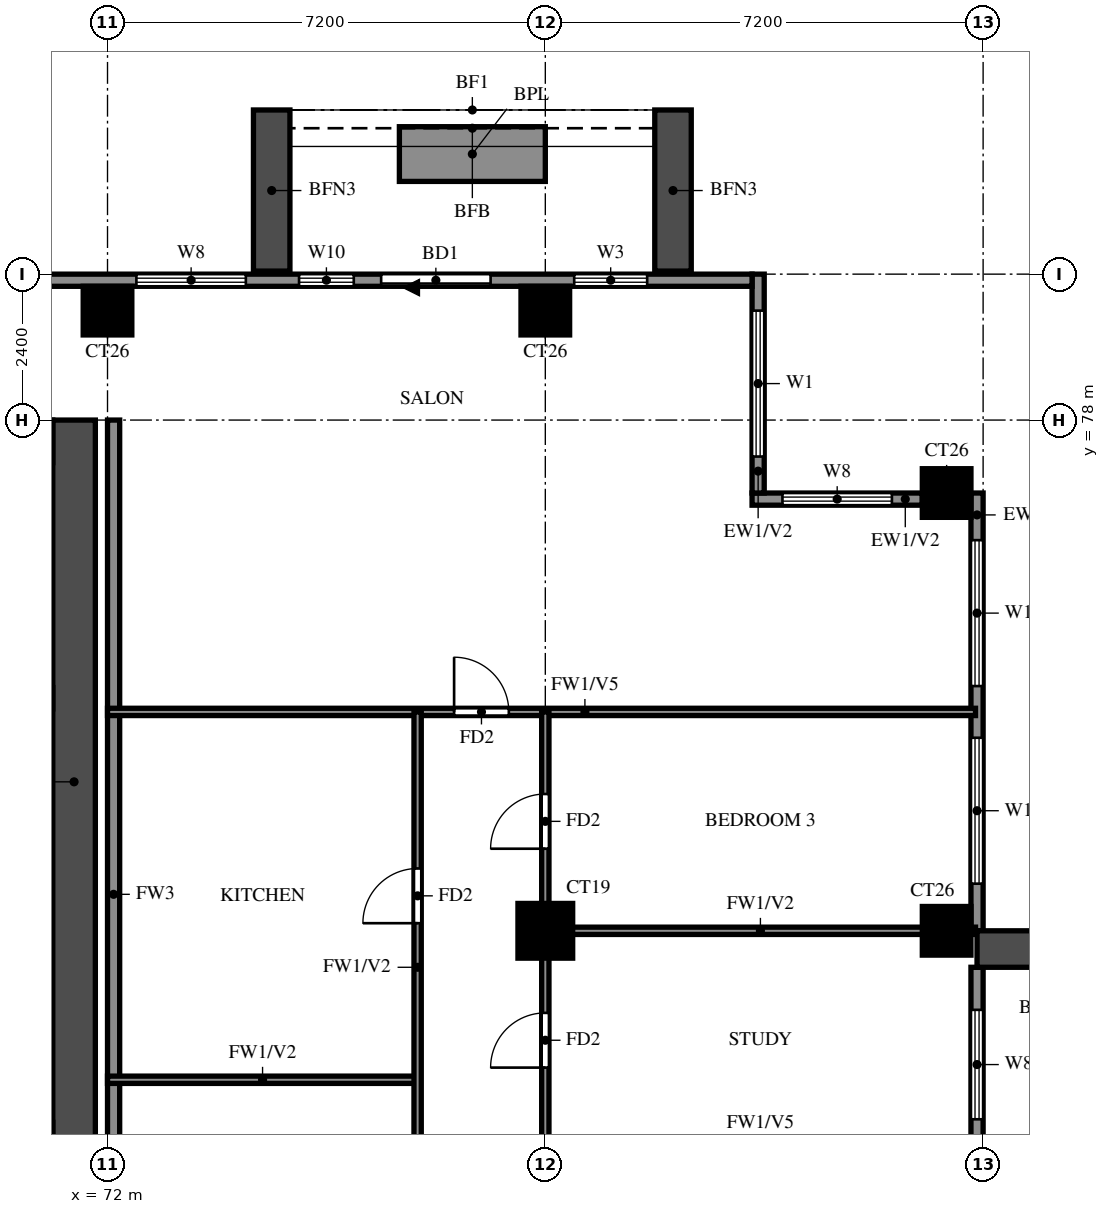
"""IFC4 building model, lengths in metres.
Left out: names, types, materials, properties, quantities, classifications, styles, units other than length and angle.
Written with IfcOpenShell. Run it as: python <this file> out.ifc"""

import sys

from ifc_helpers import new_model, si_unit, direction, frame, frame_2d, origin, origin_2d, place, context, subcontext, project, spatial, rectangle, extrude, source, transform, mapped, element, fill, save


model = new_model("IFC4")
c1 = context("Model", 3, precision=1e-05, world=origin(), true_north=direction((0.0, 1.0)))
c2 = subcontext(c1, "Body", "Model", "MODEL_VIEW")
j1 = project(units=[si_unit("LENGTHUNIT", "METRE"), si_unit("PLANEANGLEUNIT", "RADIAN")], contexts=[c1])
p1 = place(None, origin())
s1 = spatial("IfcSite", under=j1, at=p1, CompositionType="ELEMENT")
p2 = place(p1, origin())
s2 = spatial("IfcBuilding", under=s1, at=p2, CompositionType="ELEMENT")
p3 = place(p2, frame((0.0, 0.0, 192.0)))
s3 = spatial("IfcBuildingStorey", under=s2, at=p3, CompositionType="ELEMENT", Elevation=192.0)
m1 = source(origin(), c2, "Body", "SweptSolid", [
    extrude(rectangle(XDim=0.9, YDim=0.9, at=origin_2d()), origin(), (0.0, 0.0, 1.0), 3.2),
])
p4 = place(p3, frame((79.2, 69.6, 0.0), z_axis=(0.0, 0.0, 1.0), x_axis=(1.0, 0.0, 0.0)))
e1 = element("IfcColumn", 1, at=p4, inside=s3, PredefinedType="COLUMN", context=c2, shape_type="MappedRepresentation", body=[
    mapped(m1, transform((0.0, 0.0, 0.0))),
])
m2 = source(origin(), c2, "Body", "SweptSolid", [
    extrude(rectangle(XDim=0.8, YDim=0.8, at=origin_2d()), origin(), (0.0, 0.0, 1.0), 3.2),
])
for number, where, z_axis, x_axis in (
    (2, (85.8, 69.6, 0.0), (0.0, 0.0, 1.0), (1.0, 0.0, 0.0)),
    (3, (85.8, 76.8, 0.0), (0.0, 0.0, 1.0), (1.0, 0.0, 0.0)),
    (4, (72.0, 79.8, 0.0), (0.0, 0.0, 1.0), (1.0, 0.0, 0.0)),
    (5, (79.2, 79.8, 0.0), (0.0, 0.0, 1.0), (1.0, 0.0, 0.0)),
):
    element("IfcColumn", number, at=place(p3, frame(where, z_axis=z_axis, x_axis=x_axis)), inside=s3, PredefinedType="COLUMN", context=c2, shape_type="MappedRepresentation", body=[
        mapped(m2, transform((0.0, 0.0, 0.0))),
    ])
p5 = place(p3, frame((71.45, 66.1, 0.0), z_axis=(0.0, 0.0, 1.0), x_axis=(0.0, 1.0, 0.0)))
e6 = element("IfcWall", 6, at=p5, inside=s3, PredefinedType="SHEAR", context=c2, shape_type="SweptSolid", body=[
    extrude(rectangle(XDim=11.9, YDim=0.7, at=frame_2d((5.95, 0.0))), origin(), (0.0, 0.0, 1.0), 3.2),
])
p6 = place(p3, frame((29.7, 77.65, 0.0), z_axis=(0.0, 0.0, 1.0), x_axis=(1.0, 0.0, 0.0)))
e7 = element("IfcWall", 7, at=p6, inside=s3, PredefinedType="SHEAR", context=c2, shape_type="SweptSolid", body=[
    extrude(rectangle(XDim=41.4, YDim=0.7, at=frame_2d((20.7, 0.0))), origin(), (0.0, 0.0, 1.0), 3.2),
])
p7 = place(p3, frame((29.7, 66.275, 0.0), z_axis=(0.0, 0.0, 1.0), x_axis=(1.0, 0.0, 0.0)))
e8 = element("IfcWall", 8, at=p7, inside=s3, PredefinedType="SHEAR", context=c2, shape_type="SweptSolid", body=[
    extrude(rectangle(XDim=41.4, YDim=0.35, at=frame_2d((20.7, 0.0))), origin(), (0.0, 0.0, 1.0), 3.2),
])
p8 = place(p7, frame((0.925, 0.0, 0.0)))
e9 = element("IfcOpeningElement", 9, at=p8, cuts=e8, PredefinedType="OPENING", context=c2, shape_type="SweptSolid", body=[
    extrude(rectangle(XDim=1.1, YDim=2.1, at=frame_2d((0.55, 1.05))), frame((0.0, 0.185, 0.0), z_axis=(0.0, -1.0, 0.0), x_axis=(1.0, 0.0, 0.0)), (0.0, 0.0, 1.0), 0.37),
])
p9 = place(p7, frame((3.712, 0.0, 0.0)))
e10 = element("IfcOpeningElement", 10, at=p9, cuts=e8, PredefinedType="OPENING", context=c2, shape_type="SweptSolid", body=[
    extrude(rectangle(XDim=1.8, YDim=2.1, at=frame_2d((0.9, 1.05))), frame((0.0, 0.185, 0.0), z_axis=(0.0, -1.0, 0.0), x_axis=(1.0, 0.0, 0.0)), (0.0, 0.0, 1.0), 0.37),
])
p10 = place(p3, frame((86.3, 63.0, 0.0), z_axis=(0.0, 0.0, 1.0), x_axis=(0.0, 1.0, 0.0)))
e11 = element("IfcWall", 11, at=p10, inside=s3, PredefinedType="SOLIDWALL", context=c2, shape_type="SweptSolid", body=[
    extrude(rectangle(XDim=6.0, YDim=0.2, at=frame_2d((3.0, 0.0))), origin(), (0.0, 0.0, 1.0), 3.2),
])
p11 = place(p10, frame((0.9, 0.0, 0.0)))
e12 = element("IfcOpeningElement", 12, at=p11, cuts=e11, PredefinedType="OPENING", context=c2, shape_type="SweptSolid", body=[
    extrude(rectangle(XDim=1.8, YDim=2.4, at=frame_2d((0.9, 1.2))), frame((0.0, 0.11, 0.0), z_axis=(0.0, -1.0, 0.0), x_axis=(1.0, 0.0, 0.0)), (0.0, 0.0, 1.0), 0.22),
])
p12 = place(p10, frame((3.5, 0.0, 0.6)))
e13 = element("IfcOpeningElement", 13, at=p12, cuts=e11, PredefinedType="OPENING", context=c2, shape_type="SweptSolid", body=[
    extrude(rectangle(XDim=1.8, YDim=2.4, at=frame_2d((0.9, 1.2))), frame((0.0, 0.11, 0.0), z_axis=(0.0, -1.0, 0.0), x_axis=(1.0, 0.0, 0.0)), (0.0, 0.0, 1.0), 0.22),
])
p13 = place(p3, frame((86.3, 69.6, 0.0), z_axis=(0.0, 0.0, 1.0), x_axis=(0.0, 1.0, 0.0)))
e14 = element("IfcWall", 14, at=p13, inside=s3, PredefinedType="SOLIDWALL", context=c2, shape_type="SweptSolid", body=[
    extrude(rectangle(XDim=7.2, YDim=0.2, at=frame_2d((3.6, 0.0))), origin(), (0.0, 0.0, 1.0), 3.2),
])
p14 = place(p13, frame((0.775, 0.0, 0.6)))
e15 = element("IfcOpeningElement", 15, at=p14, cuts=e14, PredefinedType="OPENING", context=c2, shape_type="SweptSolid", body=[
    extrude(rectangle(XDim=2.4, YDim=2.4, at=frame_2d((1.2, 1.2))), frame((0.0, 0.11, 0.0), z_axis=(0.0, -1.0, 0.0), x_axis=(1.0, 0.0, 0.0)), (0.0, 0.0, 1.0), 0.22),
])
p15 = place(p13, frame((4.025, 0.0, 0.6)))
e16 = element("IfcOpeningElement", 16, at=p15, cuts=e14, PredefinedType="OPENING", context=c2, shape_type="SweptSolid", body=[
    extrude(rectangle(XDim=2.4, YDim=2.4, at=frame_2d((1.2, 1.2))), frame((0.0, 0.11, 0.0), z_axis=(0.0, -1.0, 0.0), x_axis=(1.0, 0.0, 0.0)), (0.0, 0.0, 1.0), 0.22),
])
p16 = place(p3, frame((85.4, 76.7, 0.0), z_axis=(0.0, 0.0, 1.0), x_axis=(-1.0, 0.0, 0.0)))
e17 = element("IfcWall", 17, at=p16, inside=s3, PredefinedType="SOLIDWALL", context=c2, shape_type="SweptSolid", body=[
    extrude(rectangle(XDim=2.8, YDim=0.2, at=frame_2d((1.4, 0.0))), origin(), (0.0, 0.0, 1.0), 3.2),
])
p17 = place(p16, frame((0.5, 0.0, 0.6)))
e18 = element("IfcOpeningElement", 18, at=p17, cuts=e17, PredefinedType="OPENING", context=c2, shape_type="SweptSolid", body=[
    extrude(rectangle(XDim=1.8, YDim=2.4, at=frame_2d((0.9, 1.2))), frame((0.0, 0.11, 0.0), z_axis=(0.0, -1.0, 0.0), x_axis=(1.0, 0.0, 0.0)), (0.0, 0.0, 1.0), 0.22),
])
p18 = place(p3, frame((82.7, 76.8, 0.0), z_axis=(0.0, 0.0, 1.0), x_axis=(0.0, 1.0, 0.0)))
e19 = element("IfcWall", 19, at=p18, inside=s3, PredefinedType="SOLIDWALL", context=c2, shape_type="SweptSolid", body=[
    extrude(rectangle(XDim=3.6, YDim=0.2, at=frame_2d((1.8, 0.0))), origin(), (0.0, 0.0, 1.0), 3.2),
])
p19 = place(p18, frame((0.6, 0.0, 0.6)))
e20 = element("IfcOpeningElement", 20, at=p19, cuts=e19, PredefinedType="OPENING", context=c2, shape_type="SweptSolid", body=[
    extrude(rectangle(XDim=2.4, YDim=2.4, at=frame_2d((1.2, 1.2))), frame((0.0, 0.11, 0.0), z_axis=(0.0, -1.0, 0.0), x_axis=(1.0, 0.0, 0.0)), (0.0, 0.0, 1.0), 0.22),
])
p20 = place(p3, frame((82.6, 80.3, 0.0), z_axis=(0.0, 0.0, 1.0), x_axis=(-1.0, 0.0, 0.0)))
e21 = element("IfcWall", 21, at=p20, inside=s3, PredefinedType="SOLIDWALL", context=c2, shape_type="SweptSolid", body=[
    extrude(rectangle(XDim=64.6, YDim=0.2, at=frame_2d((32.3, 0.0))), origin(), (0.0, 0.0, 1.0), 3.2),
])
p21 = place(p20, frame((4.3, 0.0, 0.0)))
e22 = element("IfcOpeningElement", 22, at=p21, cuts=e21, PredefinedType="OPENING", context=c2, shape_type="SweptSolid", body=[
    extrude(rectangle(XDim=1.8, YDim=2.4, at=frame_2d((0.9, 1.2))), frame((0.0, 0.11, 0.0), z_axis=(0.0, -1.0, 0.0), x_axis=(1.0, 0.0, 0.0)), (0.0, 0.0, 1.0), 0.22),
])
p22 = place(p20, frame((54.75, 0.0, 0.6)))
e23 = element("IfcOpeningElement", 23, at=p22, cuts=e21, PredefinedType="OPENING", context=c2, shape_type="SweptSolid", body=[
    extrude(rectangle(XDim=2.4, YDim=2.4, at=frame_2d((1.2, 1.2))), frame((0.0, 0.11, 0.0), z_axis=(0.0, -1.0, 0.0), x_axis=(1.0, 0.0, 0.0)), (0.0, 0.0, 1.0), 0.22),
])
p23 = place(p20, frame((57.65, 0.0, 0.6)))
e24 = element("IfcOpeningElement", 24, at=p23, cuts=e21, PredefinedType="OPENING", context=c2, shape_type="SweptSolid", body=[
    extrude(rectangle(XDim=2.4, YDim=2.4, at=frame_2d((1.2, 1.2))), frame((0.0, 0.11, 0.0), z_axis=(0.0, -1.0, 0.0), x_axis=(1.0, 0.0, 0.0)), (0.0, 0.0, 1.0), 0.22),
])
p24 = place(p20, frame((61.975, 0.0, 0.6)))
e25 = element("IfcOpeningElement", 25, at=p24, cuts=e21, PredefinedType="OPENING", context=c2, shape_type="SweptSolid", body=[
    extrude(rectangle(XDim=1.8, YDim=2.4, at=frame_2d((0.9, 1.2))), frame((0.0, 0.11, 0.0), z_axis=(0.0, -1.0, 0.0), x_axis=(1.0, 0.0, 0.0)), (0.0, 0.0, 1.0), 0.22),
])
p25 = place(p20, frame((1.725, 0.0, 0.6)))
e26 = element("IfcOpeningElement", 26, at=p25, cuts=e21, PredefinedType="OPENING", context=c2, shape_type="SweptSolid", body=[
    extrude(rectangle(XDim=1.2, YDim=2.4, at=frame_2d((0.6, 1.2))), frame((0.0, 0.11, 0.0), z_axis=(0.0, -1.0, 0.0), x_axis=(1.0, 0.0, 0.0)), (0.0, 0.0, 1.0), 0.22),
])
p26 = place(p20, frame((6.55, 0.0, 0.6)))
e27 = element("IfcOpeningElement", 27, at=p26, cuts=e21, PredefinedType="OPENING", context=c2, shape_type="SweptSolid", body=[
    extrude(rectangle(XDim=0.9, YDim=2.4, at=frame_2d((0.45, 1.2))), frame((0.0, 0.11, 0.0), z_axis=(0.0, -1.0, 0.0), x_axis=(1.0, 0.0, 0.0)), (0.0, 0.0, 1.0), 0.22),
])
p27 = place(p20, frame((8.325, 0.0, 0.6)))
e28 = element("IfcOpeningElement", 28, at=p27, cuts=e21, PredefinedType="OPENING", context=c2, shape_type="SweptSolid", body=[
    extrude(rectangle(XDim=1.8, YDim=2.4, at=frame_2d((0.9, 1.2))), frame((0.0, 0.11, 0.0), z_axis=(0.0, -1.0, 0.0), x_axis=(1.0, 0.0, 0.0)), (0.0, 0.0, 1.0), 0.22),
])
p28 = place(p3, frame((86.3, 69.3, 0.0), z_axis=(0.0, 0.0, 1.0), x_axis=(1.0, 0.0, 0.0)))
e29 = element("IfcWall", 29, at=p28, inside=s3, PredefinedType="SOLIDWALL", context=c2, shape_type="SweptSolid", body=[
    extrude(rectangle(XDim=2.8, YDim=0.6, at=frame_2d((1.4, 0.0))), origin(), (0.0, 0.0, 1.0), 2.85),
])
for number, where, z_axis, x_axis in (
    (30, (81.3, 80.45, 0.0), (0.0, 0.0, 1.0), (0.0, 1.0, 0.0)),
    (31, (74.7, 80.45, 0.0), (0.0, 0.0, 1.0), (0.0, 1.0, 0.0)),
):
    element("IfcWall", number, at=place(p3, frame(where, z_axis=z_axis, x_axis=x_axis)), inside=s3, PredefinedType="SOLIDWALL", context=c2, shape_type="SweptSolid", body=[
        extrude(rectangle(XDim=2.65, YDim=0.6, at=frame_2d((1.325, 0.0))), origin(), (0.0, 0.0, 1.0), 2.85),
    ])
p29 = place(p3, frame((79.2, 82.375, 0.0), z_axis=(0.0, 0.0, 1.0), x_axis=(-1.0, 0.0, 0.0)))
e32 = element("IfcWall", 32, at=p29, inside=s3, PredefinedType="SOLIDWALL", context=c2, shape_type="SweptSolid", body=[
    extrude(rectangle(XDim=2.4, YDim=0.9, at=frame_2d((1.2, 0.0))), origin(), (0.0, 0.0, 1.0), 0.9),
])
p30 = place(p3, frame((72.1, 62.4, 0.0), z_axis=(0.0, 0.0, 1.0), x_axis=(0.0, 1.0, 0.0)))
e33 = element("IfcWall", 33, at=p30, inside=s3, PredefinedType="SOLIDWALL", context=c2, shape_type="SweptSolid", body=[
    extrude(rectangle(XDim=15.6, YDim=0.2, at=frame_2d((7.8, 0.0))), origin(), (0.0, 0.0, 1.0), 3.2),
])
p31 = place(p3, frame((72.0, 67.15, 0.0), z_axis=(0.0, 0.0, 1.0), x_axis=(1.0, 0.0, 0.0)))
e34 = element("IfcWall", 34, at=p31, inside=s3, PredefinedType="PARTITIONING", context=c2, shape_type="SweptSolid", body=[
    extrude(rectangle(XDim=5.1, YDim=0.12, at=frame_2d((2.55, 0.0))), origin(), (0.0, 0.0, 1.0), 3.2),
])
p32 = place(p3, frame((79.2, 69.6, 0.0), z_axis=(0.0, 0.0, 1.0), x_axis=(1.0, 0.0, 0.0)))
e35 = element("IfcWall", 35, at=p32, inside=s3, PredefinedType="PARTITIONING", context=c2, shape_type="SweptSolid", body=[
    extrude(rectangle(XDim=7.075, YDim=0.12, at=frame_2d((3.538, 0.0))), origin(), (0.0, 0.0, 1.0), 3.2),
])
p33 = place(p3, frame((72.0, 73.2, 0.0), z_axis=(0.0, 0.0, 1.0), x_axis=(1.0, 0.0, 0.0)))
e36 = element("IfcWall", 36, at=p33, inside=s3, PredefinedType="PARTITIONING", context=c2, shape_type="SweptSolid", body=[
    extrude(rectangle(XDim=14.275, YDim=0.12, at=frame_2d((7.137, 0.0))), origin(), (0.0, 0.0, 1.0), 2.3),
])
p34 = place(p33, frame((5.7, 0.0, 0.0)))
e37 = element("IfcOpeningElement", 37, at=p34, cuts=e36, PredefinedType="OPENING", context=c2, shape_type="SweptSolid", body=[
    extrude(rectangle(XDim=0.9, YDim=2.1, at=frame_2d((0.45, 1.05))), frame((0.0, 0.07, 0.0), z_axis=(0.0, -1.0, 0.0), x_axis=(1.0, 0.0, 0.0)), (0.0, 0.0, 1.0), 0.14),
])
p35 = place(p3, frame((77.1, 64.8, 0.0), z_axis=(0.0, 0.0, 1.0), x_axis=(0.0, 1.0, 0.0)))
e38 = element("IfcWall", 38, at=p35, inside=s3, PredefinedType="PARTITIONING", context=c2, shape_type="SweptSolid", body=[
    extrude(rectangle(XDim=8.4, YDim=0.12, at=frame_2d((4.2, 0.0))), origin(), (0.0, 0.0, 1.0), 3.2),
])
p36 = place(p35, frame((4.925, 0.0, 0.0)))
e39 = element("IfcOpeningElement", 39, at=p36, cuts=e38, PredefinedType="OPENING", context=c2, shape_type="SweptSolid", body=[
    extrude(rectangle(XDim=0.9, YDim=2.1, at=frame_2d((0.45, 1.05))), frame((0.0, 0.07, 0.0), z_axis=(0.0, -1.0, 0.0), x_axis=(1.0, 0.0, 0.0)), (0.0, 0.0, 1.0), 0.14),
])
p37 = place(p3, frame((79.2, 48.125, 0.0), z_axis=(0.0, 0.0, 1.0), x_axis=(0.0, 1.0, 0.0)))
e40 = element("IfcWall", 40, at=p37, inside=s3, PredefinedType="PARTITIONING", context=c2, shape_type="SweptSolid", body=[
    extrude(rectangle(XDim=25.075, YDim=0.12, at=frame_2d((12.538, 0.0))), origin(), (0.0, 0.0, 1.0), 3.2),
])
p38 = place(p37, frame((1.288, 0.0, 0.0)))
e41 = element("IfcOpeningElement", 41, at=p38, cuts=e40, PredefinedType="OPENING", context=c2, shape_type="SweptSolid", body=[
    extrude(rectangle(XDim=0.9, YDim=2.1, at=frame_2d((0.45, 1.05))), frame((0.0, 0.07, 0.0), z_axis=(0.0, -1.0, 0.0), x_axis=(1.0, 0.0, 0.0)), (0.0, 0.0, 1.0), 0.14),
])
p39 = place(p37, frame((7.825, 0.0, 0.0)))
e42 = element("IfcOpeningElement", 42, at=p39, cuts=e40, PredefinedType="OPENING", context=c2, shape_type="SweptSolid", body=[
    extrude(rectangle(XDim=1.5, YDim=2.1, at=frame_2d((0.75, 1.05))), frame((0.0, 0.07, 0.0), z_axis=(0.0, -1.0, 0.0), x_axis=(1.0, 0.0, 0.0)), (0.0, 0.0, 1.0), 0.14),
])
p40 = place(p37, frame((12.025, 0.0, 0.0)))
e43 = element("IfcOpeningElement", 43, at=p40, cuts=e40, PredefinedType="OPENING", context=c2, shape_type="SweptSolid", body=[
    extrude(rectangle(XDim=0.9, YDim=2.1, at=frame_2d((0.45, 1.05))), frame((0.0, 0.07, 0.0), z_axis=(0.0, -1.0, 0.0), x_axis=(1.0, 0.0, 0.0)), (0.0, 0.0, 1.0), 0.14),
])
p41 = place(p37, frame((15.625, 0.0, 0.0)))
e44 = element("IfcOpeningElement", 44, at=p41, cuts=e40, PredefinedType="OPENING", context=c2, shape_type="SweptSolid", body=[
    extrude(rectangle(XDim=0.9, YDim=2.1, at=frame_2d((0.45, 1.05))), frame((0.0, 0.07, 0.0), z_axis=(0.0, -1.0, 0.0), x_axis=(1.0, 0.0, 0.0)), (0.0, 0.0, 1.0), 0.14),
])
p42 = place(p37, frame((19.225, 0.0, 0.0)))
e45 = element("IfcOpeningElement", 45, at=p42, cuts=e40, PredefinedType="OPENING", context=c2, shape_type="SweptSolid", body=[
    extrude(rectangle(XDim=0.9, YDim=2.1, at=frame_2d((0.45, 1.05))), frame((0.0, 0.07, 0.0), z_axis=(0.0, -1.0, 0.0), x_axis=(1.0, 0.0, 0.0)), (0.0, 0.0, 1.0), 0.14),
])
p43 = place(p37, frame((22.825, 0.0, 0.0)))
e46 = element("IfcOpeningElement", 46, at=p43, cuts=e40, PredefinedType="OPENING", context=c2, shape_type="SweptSolid", body=[
    extrude(rectangle(XDim=0.9, YDim=2.1, at=frame_2d((0.45, 1.05))), frame((0.0, 0.07, 0.0), z_axis=(0.0, -1.0, 0.0), x_axis=(1.0, 0.0, 0.0)), (0.0, 0.0, 1.0), 0.14),
])
p44 = place(p12, origin())
e47 = element("IfcWindow", 47, at=p44, inside=s3, PartitioningType="DOUBLE_PANEL_VERTICAL", PredefinedType="WINDOW", context=c2, shape_type="SweptSolid", body=[
    extrude(rectangle(XDim=1.8, YDim=2.4, at=frame_2d((0.9, 1.2))), frame((0.0, 0.03, 0.0), z_axis=(0.0, -1.0, 0.0), x_axis=(1.0, 0.0, 0.0)), (0.0, 0.0, 1.0), 0.06),
])
fill(e13, e47)
p45 = place(p14, origin())
e48 = element("IfcWindow", 48, at=p45, inside=s3, PartitioningType="DOUBLE_PANEL_VERTICAL", PredefinedType="WINDOW", context=c2, shape_type="SweptSolid", body=[
    extrude(rectangle(XDim=2.4, YDim=2.4, at=frame_2d((1.2, 1.2))), frame((0.0, 0.03, 0.0), z_axis=(0.0, -1.0, 0.0), x_axis=(1.0, 0.0, 0.0)), (0.0, 0.0, 1.0), 0.06),
])
fill(e15, e48)
p46 = place(p15, origin())
e49 = element("IfcWindow", 49, at=p46, inside=s3, PartitioningType="DOUBLE_PANEL_VERTICAL", PredefinedType="WINDOW", context=c2, shape_type="SweptSolid", body=[
    extrude(rectangle(XDim=2.4, YDim=2.4, at=frame_2d((1.2, 1.2))), frame((0.0, 0.03, 0.0), z_axis=(0.0, -1.0, 0.0), x_axis=(1.0, 0.0, 0.0)), (0.0, 0.0, 1.0), 0.06),
])
fill(e16, e49)
p47 = place(p17, origin())
e50 = element("IfcWindow", 50, at=p47, inside=s3, PartitioningType="DOUBLE_PANEL_VERTICAL", PredefinedType="WINDOW", context=c2, shape_type="SweptSolid", body=[
    extrude(rectangle(XDim=1.8, YDim=2.4, at=frame_2d((0.9, 1.2))), frame((0.0, 0.03, 0.0), z_axis=(0.0, -1.0, 0.0), x_axis=(1.0, 0.0, 0.0)), (0.0, 0.0, 1.0), 0.06),
])
fill(e18, e50)
p48 = place(p19, origin())
e51 = element("IfcWindow", 51, at=p48, inside=s3, PartitioningType="DOUBLE_PANEL_VERTICAL", PredefinedType="WINDOW", context=c2, shape_type="SweptSolid", body=[
    extrude(rectangle(XDim=2.4, YDim=2.4, at=frame_2d((1.2, 1.2))), frame((0.0, 0.03, 0.0), z_axis=(0.0, -1.0, 0.0), x_axis=(1.0, 0.0, 0.0)), (0.0, 0.0, 1.0), 0.06),
])
fill(e20, e51)
p49 = place(p21, origin())
e52 = element("IfcDoor", 52, at=p49, inside=s3, OperationType="DOUBLE_DOOR_SLIDING", PredefinedType="DOOR", context=c2, shape_type="SweptSolid", body=[
    extrude(rectangle(XDim=1.8, YDim=2.4, at=frame_2d((0.9, 1.2))), frame((0.0, 0.025, 0.0), z_axis=(0.0, -1.0, 0.0), x_axis=(1.0, 0.0, 0.0)), (0.0, 0.0, 1.0), 0.05),
])
fill(e22, e52)
p50 = place(p25, origin())
e53 = element("IfcWindow", 53, at=p50, inside=s3, PartitioningType="SINGLE_PANEL", PredefinedType="WINDOW", context=c2, shape_type="SweptSolid", body=[
    extrude(rectangle(XDim=1.2, YDim=2.4, at=frame_2d((0.6, 1.2))), frame((0.0, 0.03, 0.0), z_axis=(0.0, -1.0, 0.0), x_axis=(1.0, 0.0, 0.0)), (0.0, 0.0, 1.0), 0.06),
])
fill(e26, e53)
p51 = place(p26, origin())
e54 = element("IfcWindow", 54, at=p51, inside=s3, PartitioningType="SINGLE_PANEL", PredefinedType="WINDOW", context=c2, shape_type="SweptSolid", body=[
    extrude(rectangle(XDim=0.9, YDim=2.4, at=frame_2d((0.45, 1.2))), frame((0.0, 0.03, 0.0), z_axis=(0.0, -1.0, 0.0), x_axis=(1.0, 0.0, 0.0)), (0.0, 0.0, 1.0), 0.06),
])
fill(e27, e54)
p52 = place(p27, origin())
e55 = element("IfcWindow", 55, at=p52, inside=s3, PartitioningType="DOUBLE_PANEL_VERTICAL", PredefinedType="WINDOW", context=c2, shape_type="SweptSolid", body=[
    extrude(rectangle(XDim=1.8, YDim=2.4, at=frame_2d((0.9, 1.2))), frame((0.0, 0.03, 0.0), z_axis=(0.0, -1.0, 0.0), x_axis=(1.0, 0.0, 0.0)), (0.0, 0.0, 1.0), 0.06),
])
fill(e28, e55)
p53 = place(p42, origin())
e56 = element("IfcDoor", 56, at=p53, inside=s3, OperationType="SINGLE_SWING_RIGHT", PredefinedType="DOOR", context=c2, shape_type="SweptSolid", body=[
    extrude(rectangle(XDim=0.9, YDim=2.1, at=frame_2d((0.45, 1.05))), frame((0.0, 0.025, 0.0), z_axis=(0.0, -1.0, 0.0), x_axis=(1.0, 0.0, 0.0)), (0.0, 0.0, 1.0), 0.05),
])
fill(e45, e56)
p54 = place(p43, origin())
e57 = element("IfcDoor", 57, at=p54, inside=s3, OperationType="SINGLE_SWING_LEFT", PredefinedType="DOOR", context=c2, shape_type="SweptSolid", body=[
    extrude(rectangle(XDim=0.9, YDim=2.1, at=frame_2d((0.45, 1.05))), frame((0.0, 0.025, 0.0), z_axis=(0.0, -1.0, 0.0), x_axis=(1.0, 0.0, 0.0)), (0.0, 0.0, 1.0), 0.05),
])
fill(e46, e57)
p55 = place(p34, origin())
e58 = element("IfcDoor", 58, at=p55, inside=s3, OperationType="SINGLE_SWING_LEFT", PredefinedType="DOOR", context=c2, shape_type="SweptSolid", body=[
    extrude(rectangle(XDim=0.9, YDim=2.1, at=frame_2d((0.45, 1.05))), frame((0.0, 0.025, 0.0), z_axis=(0.0, -1.0, 0.0), x_axis=(1.0, 0.0, 0.0)), (0.0, 0.0, 1.0), 0.05),
])
fill(e37, e58)
p56 = place(p36, origin())
e59 = element("IfcDoor", 59, at=p56, inside=s3, OperationType="SINGLE_SWING_LEFT", PredefinedType="DOOR", context=c2, shape_type="SweptSolid", body=[
    extrude(rectangle(XDim=0.9, YDim=2.1, at=frame_2d((0.45, 1.05))), frame((0.0, 0.025, 0.0), z_axis=(0.0, -1.0, 0.0), x_axis=(1.0, 0.0, 0.0)), (0.0, 0.0, 1.0), 0.05),
])
fill(e39, e59)
save(model, sys.argv[1])
